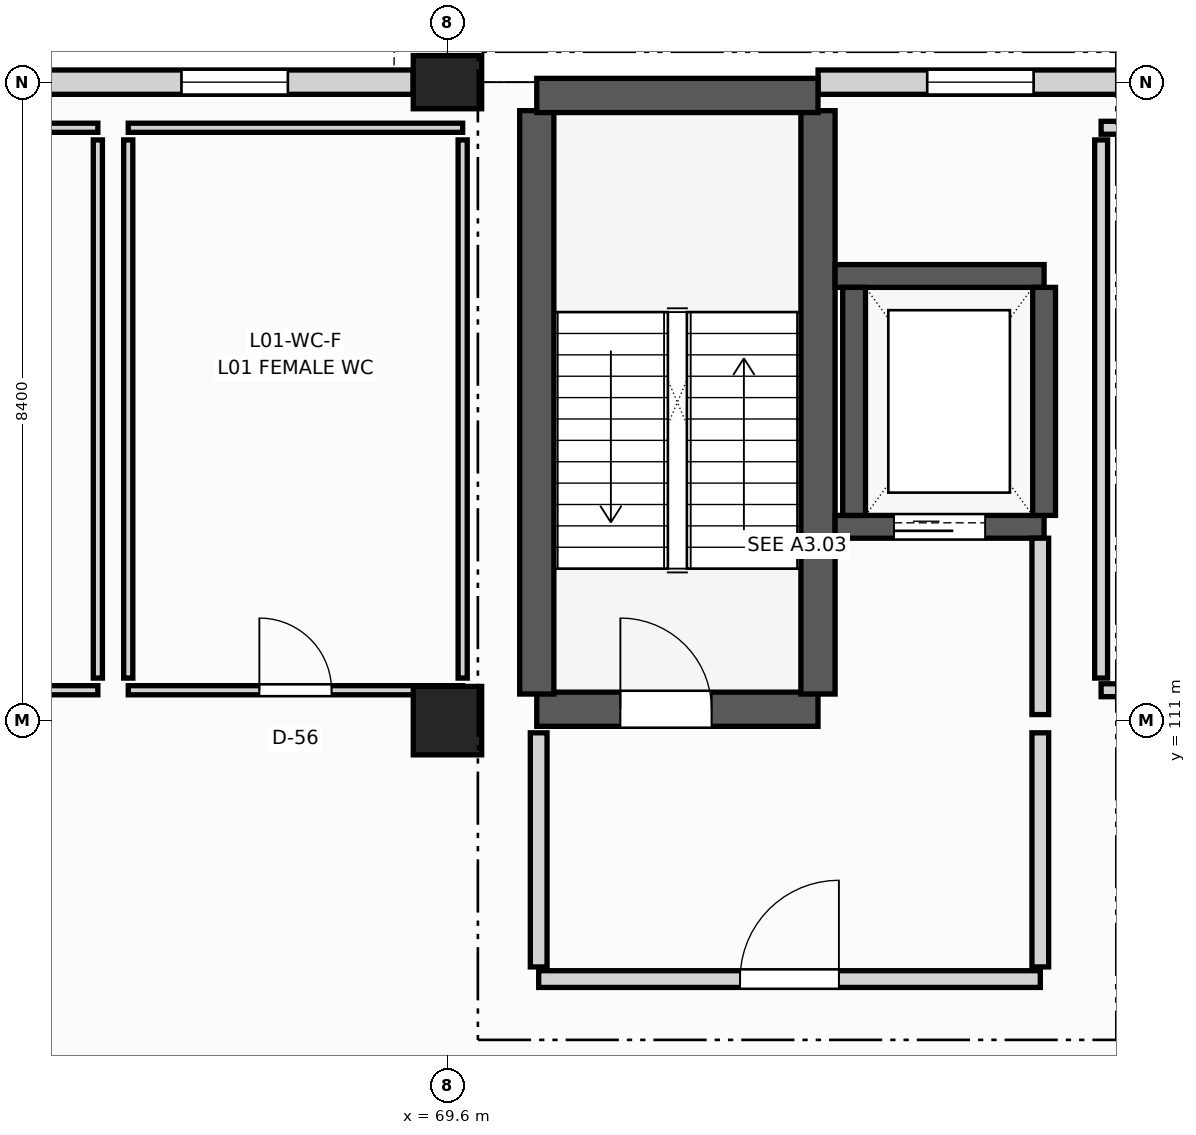
"""IFC4 building model, lengths in metres.
Left out: names, types, materials, properties, quantities, classifications, styles, units other than length and angle.
Written with IfcOpenShell. Run it as: python <this file> out.ifc"""

import sys

from ifc_helpers import new_model, si_unit, direction, frame, frame_2d, origin, origin_2d, place, context, subcontext, project, spatial, rectangle, extrude, element, fill, save


model = new_model("IFC4")
c1 = context("Model", 3, precision=1e-05, world=origin(), true_north=direction((0.0, 1.0)))
c2 = subcontext(c1, "Body", "Model", "MODEL_VIEW")
j1 = project(units=[si_unit("LENGTHUNIT", "METRE"), si_unit("PLANEANGLEUNIT", "RADIAN")], contexts=[c1])
p1 = place(None, origin())
s1 = spatial("IfcSite", under=j1, at=p1, CompositionType="ELEMENT")
p2 = place(p1, origin())
s2 = spatial("IfcBuilding", under=s1, at=p2, CompositionType="ELEMENT")
p3 = place(p2, frame((0.0, 0.0, 5.4)))
s3 = spatial("IfcBuildingStorey", under=s2, at=p3, CompositionType="ELEMENT", Elevation=5.4)
p4 = place(p3, frame((69.6, 111.0, 0.0), z_axis=(0.0, 0.0, 1.0), x_axis=(1.0, 0.0, 0.0)))
e1 = element("IfcColumn", 1, at=p4, inside=s3, PredefinedType="COLUMN", context=c2, shape_type="SweptSolid", body=[
    extrude(rectangle(XDim=0.9, YDim=0.9, at=origin_2d()), origin(), (0.0, 0.0, 1.0), 4.18),
])
p5 = place(p3, frame((69.6, 119.4, 0.0), z_axis=(0.0, 0.0, 1.0), x_axis=(1.0, 0.0, 0.0)))
e2 = element("IfcColumn", 2, at=p5, inside=s3, PredefinedType="COLUMN", context=c2, shape_type="SweptSolid", body=[
    extrude(rectangle(XDim=0.9, YDim=0.7, at=origin_2d()), origin(), (0.0, 0.0, 1.0), 4.18),
])
p6 = place(p3, frame((60.452, 119.4, 0.0), z_axis=(0.0, 0.0, 1.0), x_axis=(1.0, 0.0, 0.0)))
e3 = element("IfcWall", 3, at=p6, inside=s3, PredefinedType="SOLIDWALL", context=c2, shape_type="SweptSolid", body=[
    extrude(rectangle(XDim=8.696, YDim=0.32, at=frame_2d((4.348, 0.0))), origin(), (0.0, 0.0, 1.0), 3.38),
])
p7 = place(p6, frame((1.648, 0.0, 0.85)))
e4 = element("IfcOpeningElement", 4, at=p7, cuts=e3, PredefinedType="OPENING", context=c2, shape_type="SweptSolid", body=[
    extrude(rectangle(XDim=1.4, YDim=1.65, at=frame_2d((0.7, 0.825))), frame((0.0, 0.17, 0.0), z_axis=(0.0, -1.0, 0.0), x_axis=(1.0, 0.0, 0.0)), (0.0, 0.0, 1.0), 0.34),
])
p8 = place(p6, frame((5.648, 0.0, 0.85)))
e5 = element("IfcOpeningElement", 5, at=p8, cuts=e3, PredefinedType="OPENING", context=c2, shape_type="SweptSolid", body=[
    extrude(rectangle(XDim=1.4, YDim=1.65, at=frame_2d((0.7, 0.825))), frame((0.0, 0.17, 0.0), z_axis=(0.0, -1.0, 0.0), x_axis=(1.0, 0.0, 0.0)), (0.0, 0.0, 1.0), 0.34),
])
p9 = place(p3, frame((74.476, 119.4, 0.0), z_axis=(0.0, 0.0, 1.0), x_axis=(1.0, 0.0, 0.0)))
e6 = element("IfcWall", 6, at=p9, inside=s3, PredefinedType="SOLIDWALL", context=c2, shape_type="SweptSolid", body=[
    extrude(rectangle(XDim=4.272, YDim=0.32, at=frame_2d((2.136, 0.0))), origin(), (0.0, 0.0, 1.0), 3.38),
])
p10 = place(p9, frame((1.436, 0.0, 0.9)))
e7 = element("IfcOpeningElement", 7, at=p10, cuts=e6, PredefinedType="OPENING", context=c2, shape_type="SweptSolid", body=[
    extrude(rectangle(XDim=1.4, YDim=1.65, at=frame_2d((0.7, 0.825))), frame((0.0, 0.17, 0.0), z_axis=(0.0, -1.0, 0.0), x_axis=(1.0, 0.0, 0.0)), (0.0, 0.0, 1.0), 0.34),
])
p11 = place(p3, frame((70.775, 111.15, 0.0), z_axis=(0.0, 0.0, 1.0), x_axis=(1.0, 0.0, 0.0)))
e8 = element("IfcWall", 8, at=p11, inside=s3, PredefinedType="SHEAR", context=c2, shape_type="SweptSolid", body=[
    extrude(rectangle(XDim=3.7, YDim=0.45, at=frame_2d((1.85, 0.0))), origin(), (0.0, 0.0, 1.0), 4.18),
])
p12 = place(p11, frame((1.1, 0.0, 0.0)))
e9 = element("IfcOpeningElement", 9, at=p12, cuts=e8, PredefinedType="OPENING", context=c2, shape_type="SweptSolid", body=[
    extrude(rectangle(XDim=1.2, YDim=2.2, at=frame_2d((0.6, 1.1))), frame((0.0, 0.235, 0.0), z_axis=(0.0, -1.0, 0.0), x_axis=(1.0, 0.0, 0.0)), (0.0, 0.0, 1.0), 0.47),
])
for number, where, z_axis, x_axis in (
    (10, (70.775, 111.35, 0.0), (0.0, 0.0, 1.0), (0.0, 1.0, 0.0)),
    (11, (74.475, 111.35, 0.0), (0.0, 0.0, 1.0), (0.0, 1.0, 0.0)),
):
    element("IfcWall", number, at=place(p3, frame(where, z_axis=z_axis, x_axis=x_axis)), inside=s3, PredefinedType="SHEAR", context=c2, shape_type="SweptSolid", body=[
        extrude(rectangle(XDim=7.675, YDim=0.45, at=frame_2d((3.837, 0.0))), origin(), (0.0, 0.0, 1.0), 4.18),
    ])
p13 = place(p3, frame((70.775, 119.225, 0.0), z_axis=(0.0, 0.0, 1.0), x_axis=(1.0, 0.0, 0.0)))
e12 = element("IfcWall", 12, at=p13, inside=s3, PredefinedType="SHEAR", context=c2, shape_type="SweptSolid", body=[
    extrude(rectangle(XDim=3.7, YDim=0.45, at=frame_2d((1.85, 0.0))), origin(), (0.0, 0.0, 1.0), 4.18),
])
p14 = place(p3, frame((74.7, 113.55, 0.0), z_axis=(0.0, 0.0, 1.0), x_axis=(1.0, 0.0, 0.0)))
e13 = element("IfcWall", 13, at=p14, inside=s3, PredefinedType="SHEAR", context=c2, shape_type="SweptSolid", body=[
    extrude(rectangle(XDim=2.75, YDim=0.3, at=frame_2d((1.375, 0.0))), origin(), (0.0, 0.0, 1.0), 4.18),
])
p15 = place(p14, frame((0.775, 0.0, 0.0)))
e14 = element("IfcOpeningElement", 14, at=p15, cuts=e13, PredefinedType="OPENING", context=c2, shape_type="SweptSolid", body=[
    extrude(rectangle(XDim=1.2, YDim=2.2, at=frame_2d((0.6, 1.1))), frame((0.0, 0.16, 0.0), z_axis=(0.0, -1.0, 0.0), x_axis=(1.0, 0.0, 0.0)), (0.0, 0.0, 1.0), 0.32),
])
p16 = place(p3, frame((74.7, 116.85, 0.0), z_axis=(0.0, 0.0, 1.0), x_axis=(1.0, 0.0, 0.0)))
e15 = element("IfcWall", 15, at=p16, inside=s3, PredefinedType="SHEAR", context=c2, shape_type="SweptSolid", body=[
    extrude(rectangle(XDim=2.75, YDim=0.3, at=frame_2d((1.375, 0.0))), origin(), (0.0, 0.0, 1.0), 4.18),
])
for number, where, z_axis, x_axis in (
    (16, (74.95, 113.7, 0.0), (0.0, 0.0, 1.0), (0.0, 1.0, 0.0)),
    (17, (77.45, 113.7, 0.0), (0.0, 0.0, 1.0), (0.0, 1.0, 0.0)),
):
    element("IfcWall", number, at=place(p3, frame(where, z_axis=z_axis, x_axis=x_axis)), inside=s3, PredefinedType="SHEAR", context=c2, shape_type="SweptSolid", body=[
        extrude(rectangle(XDim=3.0, YDim=0.3, at=frame_2d((1.5, 0.0))), origin(), (0.0, 0.0, 1.0), 4.18),
    ])
p17 = place(p3, frame((70.8, 107.6, 0.0), z_axis=(0.0, 0.0, 1.0), x_axis=(1.0, 0.0, 0.0)))
e18 = element("IfcWall", 18, at=p17, inside=s3, PredefinedType="PARTITIONING", context=c2, shape_type="SweptSolid", body=[
    extrude(rectangle(XDim=6.6, YDim=0.22, at=frame_2d((3.3, 0.0))), origin(), (0.0, 0.0, 1.0), 3.22),
])
p18 = place(p17, frame((2.65, 0.0, 0.0)))
e19 = element("IfcOpeningElement", 19, at=p18, cuts=e18, PredefinedType="OPENING", context=c2, shape_type="SweptSolid", body=[
    extrude(rectangle(XDim=1.3, YDim=2.2, at=frame_2d((0.65, 1.1))), frame((0.0, 0.12, 0.0), z_axis=(0.0, -1.0, 0.0), x_axis=(1.0, 0.0, 0.0)), (0.0, 0.0, 1.0), 0.24),
])
p19 = place(p3, frame((77.4, 111.08, 0.0), z_axis=(0.0, 0.0, 1.0), x_axis=(0.0, 1.0, 0.0)))
e20 = element("IfcWall", 20, at=p19, inside=s3, PredefinedType="PARTITIONING", context=c2, shape_type="SweptSolid", body=[
    extrude(rectangle(XDim=2.32, YDim=0.22, at=frame_2d((1.16, 0.0))), origin(), (0.0, 0.0, 1.0), 3.22),
])
for number, where, z_axis, x_axis in (
    (21, (70.8, 107.76, 0.0), (0.0, 0.0, 1.0), (0.0, 1.0, 0.0)),
    (22, (77.4, 107.76, 0.0), (0.0, 0.0, 1.0), (0.0, 1.0, 0.0)),
):
    element("IfcWall", number, at=place(p3, frame(where, z_axis=z_axis, x_axis=x_axis)), inside=s3, PredefinedType="PARTITIONING", context=c2, shape_type="SweptSolid", body=[
        extrude(rectangle(XDim=3.08, YDim=0.22, at=frame_2d((1.54, 0.0))), origin(), (0.0, 0.0, 1.0), 3.22),
    ])
p20 = place(p3, frame((78.2, 111.4, 0.0), z_axis=(0.0, 0.0, 1.0), x_axis=(1.0, 0.0, 0.0)))
e23 = element("IfcWall", 23, at=p20, inside=s3, PredefinedType="PARTITIONING", context=c2, shape_type="SweptSolid", body=[
    extrude(rectangle(XDim=21.4, YDim=0.17, at=frame_2d((10.7, 0.0))), origin(), (0.0, 0.0, 1.0), 3.22),
])
p21 = place(p20, frame((6.94, 0.0, 0.0)))
e24 = element("IfcOpeningElement", 24, at=p21, cuts=e23, PredefinedType="OPENING", context=c2, shape_type="SweptSolid", body=[
    extrude(rectangle(XDim=1.1, YDim=2.2, at=frame_2d((0.55, 1.1))), frame((0.0, 0.095, 0.0), z_axis=(0.0, -1.0, 0.0), x_axis=(1.0, 0.0, 0.0)), (0.0, 0.0, 1.0), 0.19),
])
p22 = place(p3, frame((78.2, 118.8, 0.0), z_axis=(0.0, 0.0, 1.0), x_axis=(1.0, 0.0, 0.0)))
e25 = element("IfcWall", 25, at=p22, inside=s3, PredefinedType="PARTITIONING", context=c2, shape_type="SweptSolid", body=[
    extrude(rectangle(XDim=21.4, YDim=0.17, at=frame_2d((10.7, 0.0))), origin(), (0.0, 0.0, 1.0), 3.22),
])
p23 = place(p3, frame((78.2, 111.56, 0.0), z_axis=(0.0, 0.0, 1.0), x_axis=(0.0, 1.0, 0.0)))
e26 = element("IfcWall", 26, at=p23, inside=s3, PredefinedType="PARTITIONING", context=c2, shape_type="SweptSolid", body=[
    extrude(rectangle(XDim=7.08, YDim=0.17, at=frame_2d((3.54, 0.0))), origin(), (0.0, 0.0, 1.0), 3.22),
])
p24 = place(p3, frame((60.8, 111.4, 0.0), z_axis=(0.0, 0.0, 1.0), x_axis=(1.0, 0.0, 0.0)))
e27 = element("IfcWall", 27, at=p24, inside=s3, PredefinedType="PARTITIONING", context=c2, shape_type="SweptSolid", body=[
    extrude(rectangle(XDim=4.2, YDim=0.12, at=frame_2d((2.1, 0.0))), origin(), (0.0, 0.0, 1.0), 3.22),
])
p25 = place(p24, frame((1.625, 0.0, 0.0)))
e28 = element("IfcOpeningElement", 28, at=p25, cuts=e27, PredefinedType="OPENING", context=c2, shape_type="SweptSolid", body=[
    extrude(rectangle(XDim=0.95, YDim=2.1, at=frame_2d((0.475, 1.05))), frame((0.0, 0.07, 0.0), z_axis=(0.0, -1.0, 0.0), x_axis=(1.0, 0.0, 0.0)), (0.0, 0.0, 1.0), 0.14),
])
p26 = place(p3, frame((60.8, 118.8, 0.0), z_axis=(0.0, 0.0, 1.0), x_axis=(1.0, 0.0, 0.0)))
e29 = element("IfcWall", 29, at=p26, inside=s3, PredefinedType="PARTITIONING", context=c2, shape_type="SweptSolid", body=[
    extrude(rectangle(XDim=4.2, YDim=0.12, at=frame_2d((2.1, 0.0))), origin(), (0.0, 0.0, 1.0), 3.22),
])
p27 = place(p3, frame((65.0, 111.56, 0.0), z_axis=(0.0, 0.0, 1.0), x_axis=(0.0, 1.0, 0.0)))
e30 = element("IfcWall", 30, at=p27, inside=s3, PredefinedType="PARTITIONING", context=c2, shape_type="SweptSolid", body=[
    extrude(rectangle(XDim=7.08, YDim=0.12, at=frame_2d((3.54, 0.0))), origin(), (0.0, 0.0, 1.0), 3.22),
])
p28 = place(p3, frame((65.4, 111.4, 0.0), z_axis=(0.0, 0.0, 1.0), x_axis=(1.0, 0.0, 0.0)))
e31 = element("IfcWall", 31, at=p28, inside=s3, PredefinedType="PARTITIONING", context=c2, shape_type="SweptSolid", body=[
    extrude(rectangle(XDim=4.4, YDim=0.12, at=frame_2d((2.2, 0.0))), origin(), (0.0, 0.0, 1.0), 3.22),
])
p29 = place(p28, frame((1.725, 0.0, 0.0)))
e32 = element("IfcOpeningElement", 32, at=p29, cuts=e31, PredefinedType="OPENING", context=c2, shape_type="SweptSolid", body=[
    extrude(rectangle(XDim=0.95, YDim=2.1, at=frame_2d((0.475, 1.05))), frame((0.0, 0.07, 0.0), z_axis=(0.0, -1.0, 0.0), x_axis=(1.0, 0.0, 0.0)), (0.0, 0.0, 1.0), 0.14),
])
p30 = place(p3, frame((65.4, 118.8, 0.0), z_axis=(0.0, 0.0, 1.0), x_axis=(1.0, 0.0, 0.0)))
e33 = element("IfcWall", 33, at=p30, inside=s3, PredefinedType="PARTITIONING", context=c2, shape_type="SweptSolid", body=[
    extrude(rectangle(XDim=4.4, YDim=0.12, at=frame_2d((2.2, 0.0))), origin(), (0.0, 0.0, 1.0), 3.22),
])
for number, where, z_axis, x_axis in (
    (34, (65.4, 111.56, 0.0), (0.0, 0.0, 1.0), (0.0, 1.0, 0.0)),
    (35, (69.8, 111.56, 0.0), (0.0, 0.0, 1.0), (0.0, 1.0, 0.0)),
):
    element("IfcWall", number, at=place(p3, frame(where, z_axis=z_axis, x_axis=x_axis)), inside=s3, PredefinedType="PARTITIONING", context=c2, shape_type="SweptSolid", body=[
        extrude(rectangle(XDim=7.08, YDim=0.12, at=frame_2d((3.54, 0.0))), origin(), (0.0, 0.0, 1.0), 3.22),
    ])
p31 = place(p8, origin())
e36 = element("IfcWindow", 36, at=p31, inside=s3, PartitioningType="SINGLE_PANEL", PredefinedType="WINDOW", context=c2, shape_type="SweptSolid", body=[
    extrude(rectangle(XDim=1.4, YDim=1.65, at=frame_2d((0.7, 0.825))), frame((0.0, 0.03, 0.0), z_axis=(0.0, -1.0, 0.0), x_axis=(1.0, 0.0, 0.0)), (0.0, 0.0, 1.0), 0.06),
])
fill(e5, e36)
p32 = place(p10, origin())
e37 = element("IfcWindow", 37, at=p32, inside=s3, PartitioningType="SINGLE_PANEL", PredefinedType="WINDOW", context=c2, shape_type="SweptSolid", body=[
    extrude(rectangle(XDim=1.4, YDim=1.65, at=frame_2d((0.7, 0.825))), frame((0.0, 0.03, 0.0), z_axis=(0.0, -1.0, 0.0), x_axis=(1.0, 0.0, 0.0)), (0.0, 0.0, 1.0), 0.06),
])
fill(e7, e37)
p33 = place(p12, origin())
e38 = element("IfcDoor", 38, at=p33, inside=s3, OperationType="SINGLE_SWING_LEFT", PredefinedType="DOOR", context=c2, shape_type="SweptSolid", body=[
    extrude(rectangle(XDim=1.2, YDim=2.2, at=frame_2d((0.6, 1.1))), frame((0.0, 0.025, 0.0), z_axis=(0.0, -1.0, 0.0), x_axis=(1.0, 0.0, 0.0)), (0.0, 0.0, 1.0), 0.05),
])
fill(e9, e38)
p34 = place(p15, origin())
e39 = element("IfcDoor", 39, at=p34, inside=s3, OperationType="SLIDING_TO_LEFT", PredefinedType="DOOR", context=c2, shape_type="SweptSolid", body=[
    extrude(rectangle(XDim=1.2, YDim=2.2, at=frame_2d((0.6, 1.1))), frame((0.0, 0.025, 0.0), z_axis=(0.0, -1.0, 0.0), x_axis=(1.0, 0.0, 0.0)), (0.0, 0.0, 1.0), 0.05),
])
fill(e14, e39)
p35 = place(p18, origin())
e40 = element("IfcDoor", 40, at=p35, inside=s3, OperationType="SINGLE_SWING_RIGHT", PredefinedType="DOOR", context=c2, shape_type="SweptSolid", body=[
    extrude(rectangle(XDim=1.3, YDim=2.2, at=frame_2d((0.65, 1.1))), frame((0.0, 0.025, 0.0), z_axis=(0.0, -1.0, 0.0), x_axis=(1.0, 0.0, 0.0)), (0.0, 0.0, 1.0), 0.05),
])
fill(e19, e40)
p36 = place(p29, origin())
e41 = element("IfcDoor", 41, at=p36, inside=s3, OperationType="SINGLE_SWING_LEFT", PredefinedType="DOOR", context=c2, shape_type="SweptSolid", body=[
    extrude(rectangle(XDim=0.95, YDim=2.1, at=frame_2d((0.475, 1.05))), frame((0.0, 0.025, 0.0), z_axis=(0.0, -1.0, 0.0), x_axis=(1.0, 0.0, 0.0)), (0.0, 0.0, 1.0), 0.05),
])
fill(e32, e41)
save(model, sys.argv[1])
